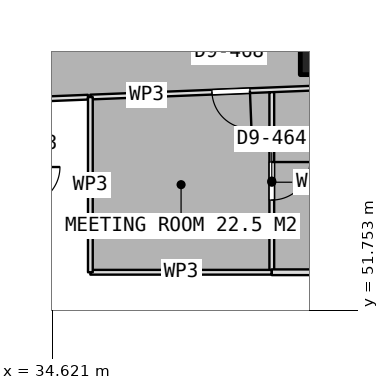
"""IFC4 building model, lengths in metres.
Left out: names, types, materials, properties, quantities, classifications, styles, units other than length and angle.
Written with IfcOpenShell. Run it as: python <this file> out.ifc"""

import sys

from ifc_helpers import new_model, si_unit, direction, frame, frame_2d, origin, origin_2d, place, context, subcontext, project, spatial, rectangle, extrude, element, fill, save


model = new_model("IFC4")
c1 = context("Model", 3, precision=1e-05, world=origin(), true_north=direction((0.0, 1.0)))
c2 = subcontext(c1, "Body", "Model", "MODEL_VIEW")
j1 = project(units=[si_unit("LENGTHUNIT", "METRE"), si_unit("PLANEANGLEUNIT", "RADIAN")], contexts=[c1])
p1 = place(None, origin())
s1 = spatial("IfcSite", under=j1, at=p1, CompositionType="ELEMENT")
p2 = place(p1, origin())
s2 = spatial("IfcBuilding", under=s1, at=p2, CompositionType="ELEMENT")
p3 = place(p2, frame((0.0, 0.0, 121.55)))
s3 = spatial("IfcBuildingStorey", under=s2, at=p3, CompositionType="ELEMENT", Elevation=121.55)
p4 = place(p3, frame((42.0, 58.8, 0.0), z_axis=(0.0, 0.0, 1.0), x_axis=(1.0, 0.0, 0.0)))
e1 = element("IfcColumn", 1, at=p4, inside=s3, PredefinedType="COLUMN", context=c2, shape_type="SweptSolid", body=[
    extrude(rectangle(XDim=1.7, YDim=1.7, at=origin_2d()), origin(), (0.0, 0.0, 1.0), 3.75),
])
p5 = place(p3, frame((35.563, 57.357, 0.0), z_axis=(0.0, 0.0, 1.0), x_axis=(-0.999191272238, -0.04020947008, 0.0)))
e2 = element("IfcWall", 2, at=p5, inside=s3, PredefinedType="PARTITIONING", context=c2, shape_type="SweptSolid", body=[
    extrude(rectangle(XDim=1.737, YDim=0.125, at=frame_2d((0.868, 0.0))), origin(), (0.0, 0.0, 1.0), 3.5),
])
p6 = place(p3, frame((43.023, 57.656, 0.0), z_axis=(0.0, 0.0, 1.0), x_axis=(-0.999200853354, -0.039970672462, 0.0)))
e3 = element("IfcWall", 3, at=p6, inside=s3, PredefinedType="PARTITIONING", context=c2, shape_type="SweptSolid", body=[
    extrude(rectangle(XDim=7.403, YDim=0.125, at=frame_2d((3.701, 0.0))), origin(), (0.0, 0.0, 1.0), 3.5),
])
p7 = place(p6, frame((3.201, 0.0, 0.0)))
e4 = element("IfcOpeningElement", 4, at=p7, cuts=e3, PredefinedType="OPENING", context=c2, shape_type="SweptSolid", body=[
    extrude(rectangle(XDim=1.0, YDim=2.1, at=frame_2d((0.5, 1.05))), frame((0.0, 0.073, 0.0), z_axis=(0.0, -1.0, 0.0), x_axis=(1.0, 0.0, 0.0)), (0.0, 0.0, 1.0), 0.145),
])
p8 = place(p3, frame((40.4, 57.488, 0.0), z_axis=(0.0, 0.0, 1.0), x_axis=(0.0, -1.0, 0.0)))
e5 = element("IfcWall", 5, at=p8, inside=s3, PredefinedType="PARTITIONING", context=c2, shape_type="SweptSolid", body=[
    extrude(rectangle(XDim=4.738, YDim=0.125, at=frame_2d((2.369, 0.0))), origin(), (0.0, 0.0, 1.0), 3.5),
])
p9 = place(p8, frame((1.838, 0.0, 0.0)))
e6 = element("IfcOpeningElement", 6, at=p9, cuts=e5, PredefinedType="OPENING", context=c2, shape_type="SweptSolid", body=[
    extrude(rectangle(XDim=1.0, YDim=2.1, at=frame_2d((0.5, 1.05))), frame((0.0, 0.073, 0.0), z_axis=(0.0, -1.0, 0.0), x_axis=(1.0, 0.0, 0.0)), (0.0, 0.0, 1.0), 0.145),
])
p10 = place(p3, frame((40.4, 52.75, 0.0), z_axis=(0.0, 0.0, 1.0), x_axis=(-1.0, 0.0, 0.0)))
e7 = element("IfcWall", 7, at=p10, inside=s3, PredefinedType="PARTITIONING", context=c2, shape_type="SweptSolid", body=[
    extrude(rectangle(XDim=4.774, YDim=0.125, at=frame_2d((2.387, 0.0))), origin(), (0.0, 0.0, 1.0), 3.5),
])
p11 = place(p3, frame((35.626, 52.75, 0.0), z_axis=(0.0, 0.0, 1.0), x_axis=(0.0, 1.0, 0.0)))
e8 = element("IfcWall", 8, at=p11, inside=s3, PredefinedType="PARTITIONING", context=c2, shape_type="SweptSolid", body=[
    extrude(rectangle(XDim=4.61, YDim=0.125, at=frame_2d((2.305, 0.0))), origin(), (0.0, 0.0, 1.0), 3.5),
])
p12 = place(p3, frame((53.2, 52.75, 0.0), z_axis=(0.0, 0.0, 1.0), x_axis=(-1.0, 0.0, 0.0)))
e9 = element("IfcWall", 9, at=p12, inside=s3, PredefinedType="PARTITIONING", context=c2, shape_type="SweptSolid", body=[
    extrude(rectangle(XDim=12.8, YDim=0.15, at=frame_2d((6.4, 0.0))), origin(), (0.0, 0.0, 1.0), 3.5),
])
p13 = place(p9, origin())
e10 = element("IfcDoor", 10, at=p13, inside=s3, OperationType="SINGLE_SWING_LEFT", PredefinedType="DOOR", context=c2, shape_type="SweptSolid", body=[
    extrude(rectangle(XDim=1.0, YDim=2.1, at=frame_2d((0.5, 1.05))), frame((0.0, 0.025, 0.0), z_axis=(0.0, -1.0, 0.0), x_axis=(1.0, 0.0, 0.0)), (0.0, 0.0, 1.0), 0.05),
])
fill(e6, e10)
p14 = place(p7, origin())
e11 = element("IfcDoor", 11, at=p14, inside=s3, OperationType="SINGLE_SWING_LEFT", PredefinedType="DOOR", context=c2, shape_type="SweptSolid", body=[
    extrude(rectangle(XDim=1.0, YDim=2.1, at=frame_2d((0.5, 1.05))), frame((0.0, 0.025, 0.0), z_axis=(0.0, -1.0, 0.0), x_axis=(1.0, 0.0, 0.0)), (0.0, 0.0, 1.0), 0.05),
])
fill(e4, e11)
save(model, sys.argv[1])
